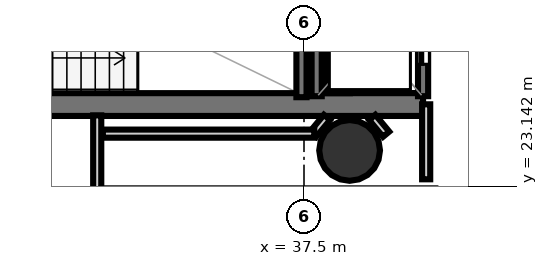
"""IFC4 building model, lengths in metres.
Left out: names, types, materials, properties, quantities, classifications, styles, units other than length and angle.
Written with IfcOpenShell. Run it as: python <this file> out.ifc"""

import sys

from ifc_helpers import new_model, si_unit, direction, frame, frame_2d, origin, origin_2d, place, context, subcontext, project, spatial, rectangle, hollow_circle, extrude, element, fill, save


model = new_model("IFC4")
c1 = context("Model", 3, precision=1e-05, world=origin(), true_north=direction((0.0, 1.0)))
c2 = subcontext(c1, "Body", "Model", "MODEL_VIEW")
j1 = project(units=[si_unit("LENGTHUNIT", "METRE"), si_unit("PLANEANGLEUNIT", "RADIAN")], contexts=[c1])
p1 = place(None, origin())
s1 = spatial("IfcSite", under=j1, at=p1, CompositionType="ELEMENT")
p2 = place(p1, origin())
s2 = spatial("IfcBuilding", under=s1, at=p2, CompositionType="ELEMENT")
p3 = place(p2, frame((0.0, 0.0, 200.3)))
s3 = spatial("IfcBuildingStorey", under=s2, at=p3, CompositionType="ELEMENT", Elevation=200.3)
p4 = place(p3, frame((29.33, 24.755, 0.0), z_axis=(0.0, 0.0, 1.0), x_axis=(1.0, 0.0, 0.0)))
e1 = element("IfcWall", 1, at=p4, inside=s3, PredefinedType="SHEAR", context=c2, shape_type="SweptSolid", body=[
    extrude(rectangle(XDim=10.52, YDim=0.45, at=frame_2d((5.26, 0.0))), origin(), (0.0, 0.0, 1.0), 3.52),
])
p5 = place(p4, frame((0.695, 0.0, 0.0)))
e2 = element("IfcOpeningElement", 2, at=p5, cuts=e1, PredefinedType="OPENING", context=c2, shape_type="SweptSolid", body=[
    extrude(rectangle(XDim=1.25, YDim=2.15, at=frame_2d((0.625, 1.075))), frame((0.0, 0.235, 0.0), z_axis=(0.0, -1.0, 0.0), x_axis=(1.0, 0.0, 0.0)), (0.0, 0.0, 1.0), 0.47),
])
p6 = place(p3, frame((38.18, 24.98, 0.0), z_axis=(0.0, 0.0, 1.0), x_axis=(0.0, 1.0, 0.0)))
e3 = element("IfcWall", 3, at=p6, inside=s3, PredefinedType="SHEAR", context=c2, shape_type="SweptSolid", body=[
    extrude(rectangle(XDim=7.44, YDim=0.45, at=frame_2d((3.72, 0.0))), origin(), (0.0, 0.0, 1.0), 3.52),
])
p7 = place(p3, frame((38.4, 23.85, 0.0), z_axis=(0.0, 0.0, 1.0), x_axis=(1.0, 0.0, 0.0)))
e4 = element("IfcColumn", 4, at=p7, inside=s3, PredefinedType="COLUMN", context=c2, shape_type="SweptSolid", body=[
    extrude(hollow_circle(Radius=0.6, WallThickness=0.03, at=origin_2d()), origin(), (0.0, 0.0, 1.0), 3.7),
])
p8 = place(p3, frame((37.45, 24.9, 0.0), z_axis=(0.0, 0.0, 1.0), x_axis=(0.0, 1.0, 0.0)))
e5 = element("IfcWall", 5, at=p8, inside=s3, PredefinedType="SOLIDWALL", context=c2, shape_type="SweptSolid", body=[
    extrude(rectangle(XDim=3.06, YDim=0.2, at=frame_2d((1.53, 0.0))), origin(), (0.0, 0.0, 1.0), 3.52),
])
p9 = place(p3, frame((39.85, 24.92, 0.0), z_axis=(0.0, 0.0, 1.0), x_axis=(0.0, 1.0, 0.0)))
e6 = element("IfcWall", 6, at=p9, inside=s3, PredefinedType="SOLIDWALL", context=c2, shape_type="SweptSolid", body=[
    extrude(rectangle(XDim=2.36, YDim=0.2, at=frame_2d((1.18, 0.0))), origin(), (0.0, 0.0, 1.0), 3.52),
])
p10 = place(p9, frame((0.63, 0.0, 0.0)))
e7 = element("IfcOpeningElement", 7, at=p10, cuts=e6, PredefinedType="OPENING", context=c2, shape_type="SweptSolid", body=[
    extrude(rectangle(XDim=1.1, YDim=2.15, at=frame_2d((0.55, 1.075))), frame((0.0, 0.11, 0.0), z_axis=(0.0, -1.0, 0.0), x_axis=(1.0, 0.0, 0.0)), (0.0, 0.0, 1.0), 0.22),
])
p11 = place(p3, frame((37.75, 24.92, 0.0), z_axis=(0.0, 0.0, 1.0), x_axis=(0.0, 1.0, 0.0)))
e8 = element("IfcWall", 8, at=p11, inside=s3, PredefinedType="SOLIDWALL", context=c2, shape_type="SweptSolid", body=[
    extrude(rectangle(XDim=2.36, YDim=0.2, at=frame_2d((1.18, 0.0))), origin(), (0.0, 0.0, 1.0), 3.52),
])
p12 = place(p3, frame((33.419, 24.542, 0.0), z_axis=(0.0, 0.0, 1.0), x_axis=(0.0, -1.0, 0.0)))
e9 = element("IfcWall", 9, at=p12, inside=s3, PredefinedType="PARTITIONING", context=c2, shape_type="SweptSolid", body=[
    extrude(rectangle(XDim=2.692, YDim=0.16, at=frame_2d((1.346, 0.0))), origin(), (0.0, 0.0, 1.0), 2.84),
])
p13 = place(p3, frame((39.911, 23.28, 0.0), z_axis=(0.0, 0.0, 1.0), x_axis=(0.0, 1.0, 0.0)))
e10 = element("IfcWall", 10, at=p13, inside=s3, PredefinedType="PARTITIONING", context=c2, shape_type="SweptSolid", body=[
    extrude(rectangle(XDim=1.48, YDim=0.16, at=frame_2d((0.74, 0.0))), origin(), (0.0, 0.0, 1.0), 2.84),
])
for number, where, z_axis, x_axis in (
    (11, (39.121, 24.17, 0.0), (0.0, 0.0, 1.0), (-0.638, 0.77, 0.0)),
    (12, (37.954, 24.502, 0.0), (0.0, 0.0, 1.0), (-0.638, -0.77, 0.0)),
):
    element("IfcWall", number, at=place(p3, frame(where, z_axis=z_axis, x_axis=x_axis)), inside=s3, PredefinedType="PARTITIONING", context=c2, shape_type="SweptSolid", body=[
        extrude(rectangle(XDim=0.431, YDim=0.16, at=frame_2d((0.215, 0.0))), origin(), (0.0, 0.0, 1.0), 2.84),
    ])
p14 = place(p3, frame((37.703, 24.181, 0.0), z_axis=(0.0, 0.0, 1.0), x_axis=(-1.0, 0.0, 0.0)))
e13 = element("IfcWall", 13, at=p14, inside=s3, PredefinedType="PARTITIONING", context=c2, shape_type="SweptSolid", body=[
    extrude(rectangle(XDim=4.173, YDim=0.16, at=frame_2d((2.086, 0.0))), origin(), (0.0, 0.0, 1.0), 2.84),
])
p15 = place(p10, origin())
e14 = element("IfcDoor", 14, at=p15, inside=s3, OperationType="SLIDING_TO_LEFT", PredefinedType="DOOR", context=c2, shape_type="SweptSolid", body=[
    extrude(rectangle(XDim=1.1, YDim=2.15, at=frame_2d((0.55, 1.075))), frame((0.0, 0.025, 0.0), z_axis=(0.0, -1.0, 0.0), x_axis=(1.0, 0.0, 0.0)), (0.0, 0.0, 1.0), 0.05),
])
fill(e7, e14)
save(model, sys.argv[1])
